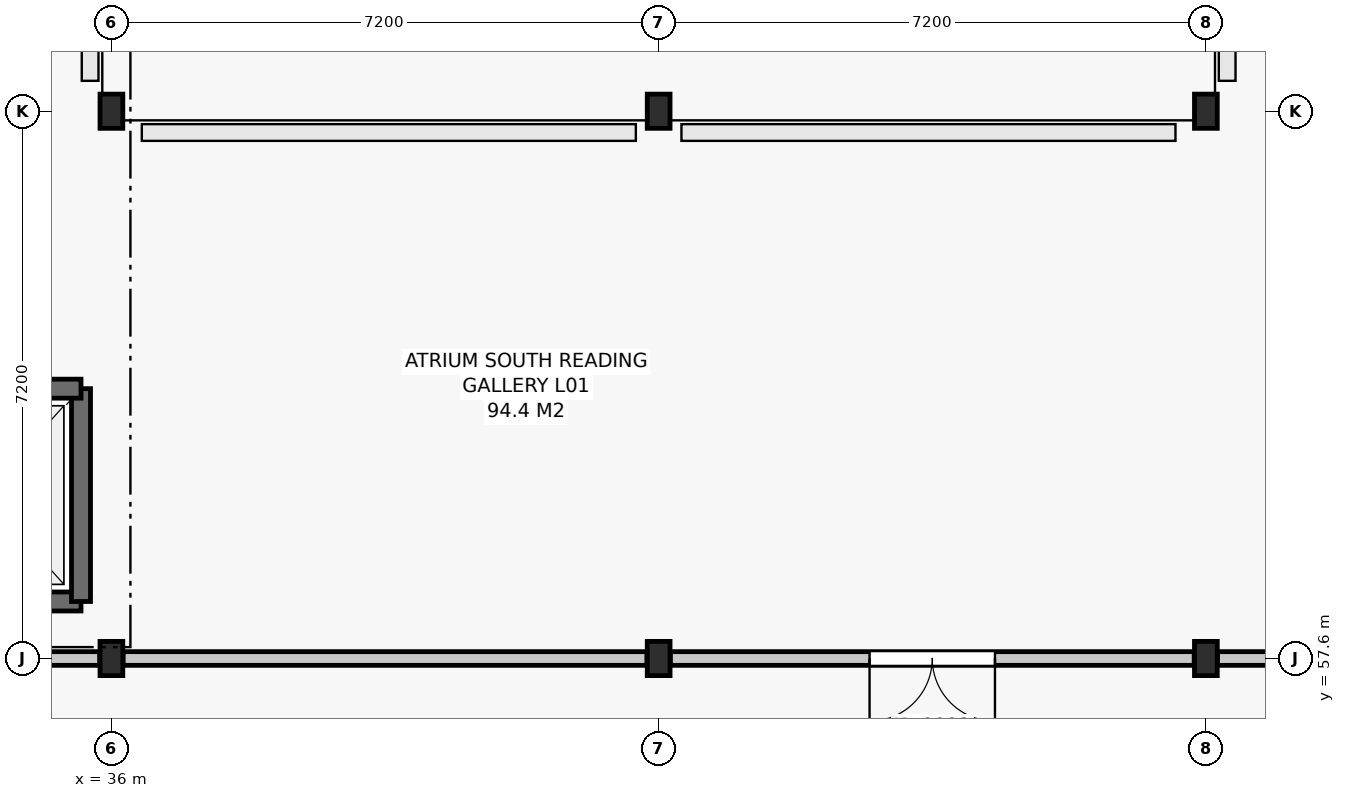
"""IFC4 building model, lengths in metres.
Left out: names, types, materials, properties, quantities, classifications, styles, units other than length and angle.
Written with IfcOpenShell. Run it as: python <this file> out.ifc"""

import sys

from ifc_helpers import new_model, si_unit, direction, frame, frame_2d, origin, origin_2d, place, context, subcontext, project, spatial, rectangle, i_section, extrude, element, fill, save


model = new_model("IFC4")
c1 = context("Model", 3, precision=1e-05, world=origin(), true_north=direction((0.0, 1.0)))
c2 = subcontext(c1, "Body", "Model", "MODEL_VIEW")
j1 = project(units=[si_unit("LENGTHUNIT", "METRE"), si_unit("PLANEANGLEUNIT", "RADIAN")], contexts=[c1])
p1 = place(None, origin())
s1 = spatial("IfcSite", under=j1, at=p1, CompositionType="ELEMENT")
p2 = place(p1, origin())
s2 = spatial("IfcBuilding", under=s1, at=p2, CompositionType="ELEMENT")
p3 = place(p2, frame((0.0, 0.0, 5.4)))
s3 = spatial("IfcBuildingStorey", under=s2, at=p3, CompositionType="ELEMENT", Elevation=5.4)
for number, where, z_axis, x_axis in (
    (1, (36.0, 57.6, 0.0), (0.0, 0.0, 1.0), (1.0, 0.0, 0.0)),
    (2, (36.0, 64.8, 0.0), (0.0, 0.0, 1.0), (1.0, 0.0, 0.0)),
    (3, (43.2, 57.6, 0.0), (0.0, 0.0, 1.0), (1.0, 0.0, 0.0)),
    (4, (43.2, 64.8, 0.0), (0.0, 0.0, 1.0), (1.0, 0.0, 0.0)),
    (5, (50.4, 57.6, 0.0), (0.0, 0.0, 1.0), (1.0, 0.0, 0.0)),
    (6, (50.4, 64.8, 0.0), (0.0, 0.0, 1.0), (1.0, 0.0, 0.0)),
):
    element("IfcColumn", number, at=place(p3, frame(where, z_axis=z_axis, x_axis=x_axis)), inside=s3, PredefinedType="COLUMN", context=c2, shape_type="SweptSolid", body=[
        extrude(i_section(OverallWidth=0.3, OverallDepth=0.45, WebThickness=0.014, FlangeThickness=0.026, FilletRadius=0.027, at=origin_2d()), origin(), (0.0, 0.0, 1.0), 4.8),
    ])
p4 = place(p3, frame((33.05, 58.35, 0.0), z_axis=(0.0, 0.0, 1.0), x_axis=(1.0, 0.0, 0.0)))
e7 = element("IfcWall", 7, at=p4, inside=s3, PredefinedType="SHEAR", context=c2, shape_type="SweptSolid", body=[
    extrude(rectangle(XDim=2.55, YDim=0.25, at=frame_2d((1.275, 0.0))), origin(), (0.0, 0.0, 1.0), 4.52),
])
p5 = place(p3, frame((35.6, 58.35, 0.0), z_axis=(0.0, 0.0, 1.0), x_axis=(0.0, 1.0, 0.0)))
e8 = element("IfcWall", 8, at=p5, inside=s3, PredefinedType="SHEAR", context=c2, shape_type="SweptSolid", body=[
    extrude(rectangle(XDim=2.8, YDim=0.25, at=frame_2d((1.4, 0.0))), origin(), (0.0, 0.0, 1.0), 4.52),
])
p6 = place(p3, frame((35.6, 61.15, 0.0), z_axis=(0.0, 0.0, 1.0), x_axis=(-1.0, 0.0, 0.0)))
e9 = element("IfcWall", 9, at=p6, inside=s3, PredefinedType="SHEAR", context=c2, shape_type="SweptSolid", body=[
    extrude(rectangle(XDim=2.55, YDim=0.25, at=frame_2d((1.275, 0.0))), origin(), (0.0, 0.0, 1.0), 4.52),
])
p7 = place(p6, frame((0.725, 0.0, 0.0)))
e10 = element("IfcOpeningElement", 10, at=p7, cuts=e9, PredefinedType="OPENING", context=c2, shape_type="SweptSolid", body=[
    extrude(rectangle(XDim=1.1, YDim=2.1, at=frame_2d((0.55, 1.05))), frame((0.0, 0.137, 0.0), z_axis=(0.0, -1.0, 0.0), x_axis=(1.0, 0.0, 0.0)), (0.0, 0.0, 1.0), 0.274),
])
for number, where, z_axis, x_axis in (
    (11, (28.954, 57.6, 0.0), (0.0, 0.0, 1.0), (1.0, 0.0, 0.0)),
    (12, (36.154, 57.6, 0.0), (0.0, 0.0, 1.0), (1.0, 0.0, 0.0)),
):
    element("IfcWall", number, at=place(p3, frame(where, z_axis=z_axis, x_axis=x_axis)), inside=s3, PredefinedType="PARTITIONING", context=c2, shape_type="SweptSolid", body=[
        extrude(rectangle(XDim=6.892, YDim=0.18, at=frame_2d((3.446, 0.0))), origin(), (0.0, 0.0, 1.0), 4.065),
    ])
p8 = place(p3, frame((43.354, 57.6, 0.0), z_axis=(0.0, 0.0, 1.0), x_axis=(1.0, 0.0, 0.0)))
e13 = element("IfcWall", 13, at=p8, inside=s3, PredefinedType="PARTITIONING", context=c2, shape_type="SweptSolid", body=[
    extrude(rectangle(XDim=6.892, YDim=0.18, at=frame_2d((3.446, 0.0))), origin(), (0.0, 0.0, 1.0), 4.065),
])
p9 = place(p8, frame((2.621, 0.0, 0.0)))
e14 = element("IfcOpeningElement", 14, at=p9, cuts=e13, PredefinedType="OPENING", context=c2, shape_type="SweptSolid", body=[
    extrude(rectangle(XDim=1.65, YDim=2.25, at=frame_2d((0.825, 1.125))), frame((0.0, 0.102, 0.0), z_axis=(0.0, -1.0, 0.0), x_axis=(1.0, 0.0, 0.0)), (0.0, 0.0, 1.0), 0.204),
])
p10 = place(p3, frame((50.554, 57.6, 0.0), z_axis=(0.0, 0.0, 1.0), x_axis=(1.0, 0.0, 0.0)))
e15 = element("IfcWall", 15, at=p10, inside=s3, PredefinedType="PARTITIONING", context=c2, shape_type="SweptSolid", body=[
    extrude(rectangle(XDim=6.892, YDim=0.18, at=frame_2d((3.446, 0.0))), origin(), (0.0, 0.0, 1.0), 4.065),
])
p11 = place(p9, frame((1.65, 0.0, 0.0), z_axis=(0.0, 0.0, 1.0), x_axis=(-1.0, 0.0, 0.0)))
e16 = element("IfcDoor", 16, at=p11, inside=s3, OperationType="DOUBLE_DOOR_SINGLE_SWING", PredefinedType="DOOR", context=c2, shape_type="SweptSolid", body=[
    extrude(rectangle(XDim=1.65, YDim=2.25, at=frame_2d((0.825, 1.125))), frame((0.0, 0.025, 0.0), z_axis=(0.0, -1.0, 0.0), x_axis=(1.0, 0.0, 0.0)), (0.0, 0.0, 1.0), 0.05),
])
fill(e14, e16)
save(model, sys.argv[1])
